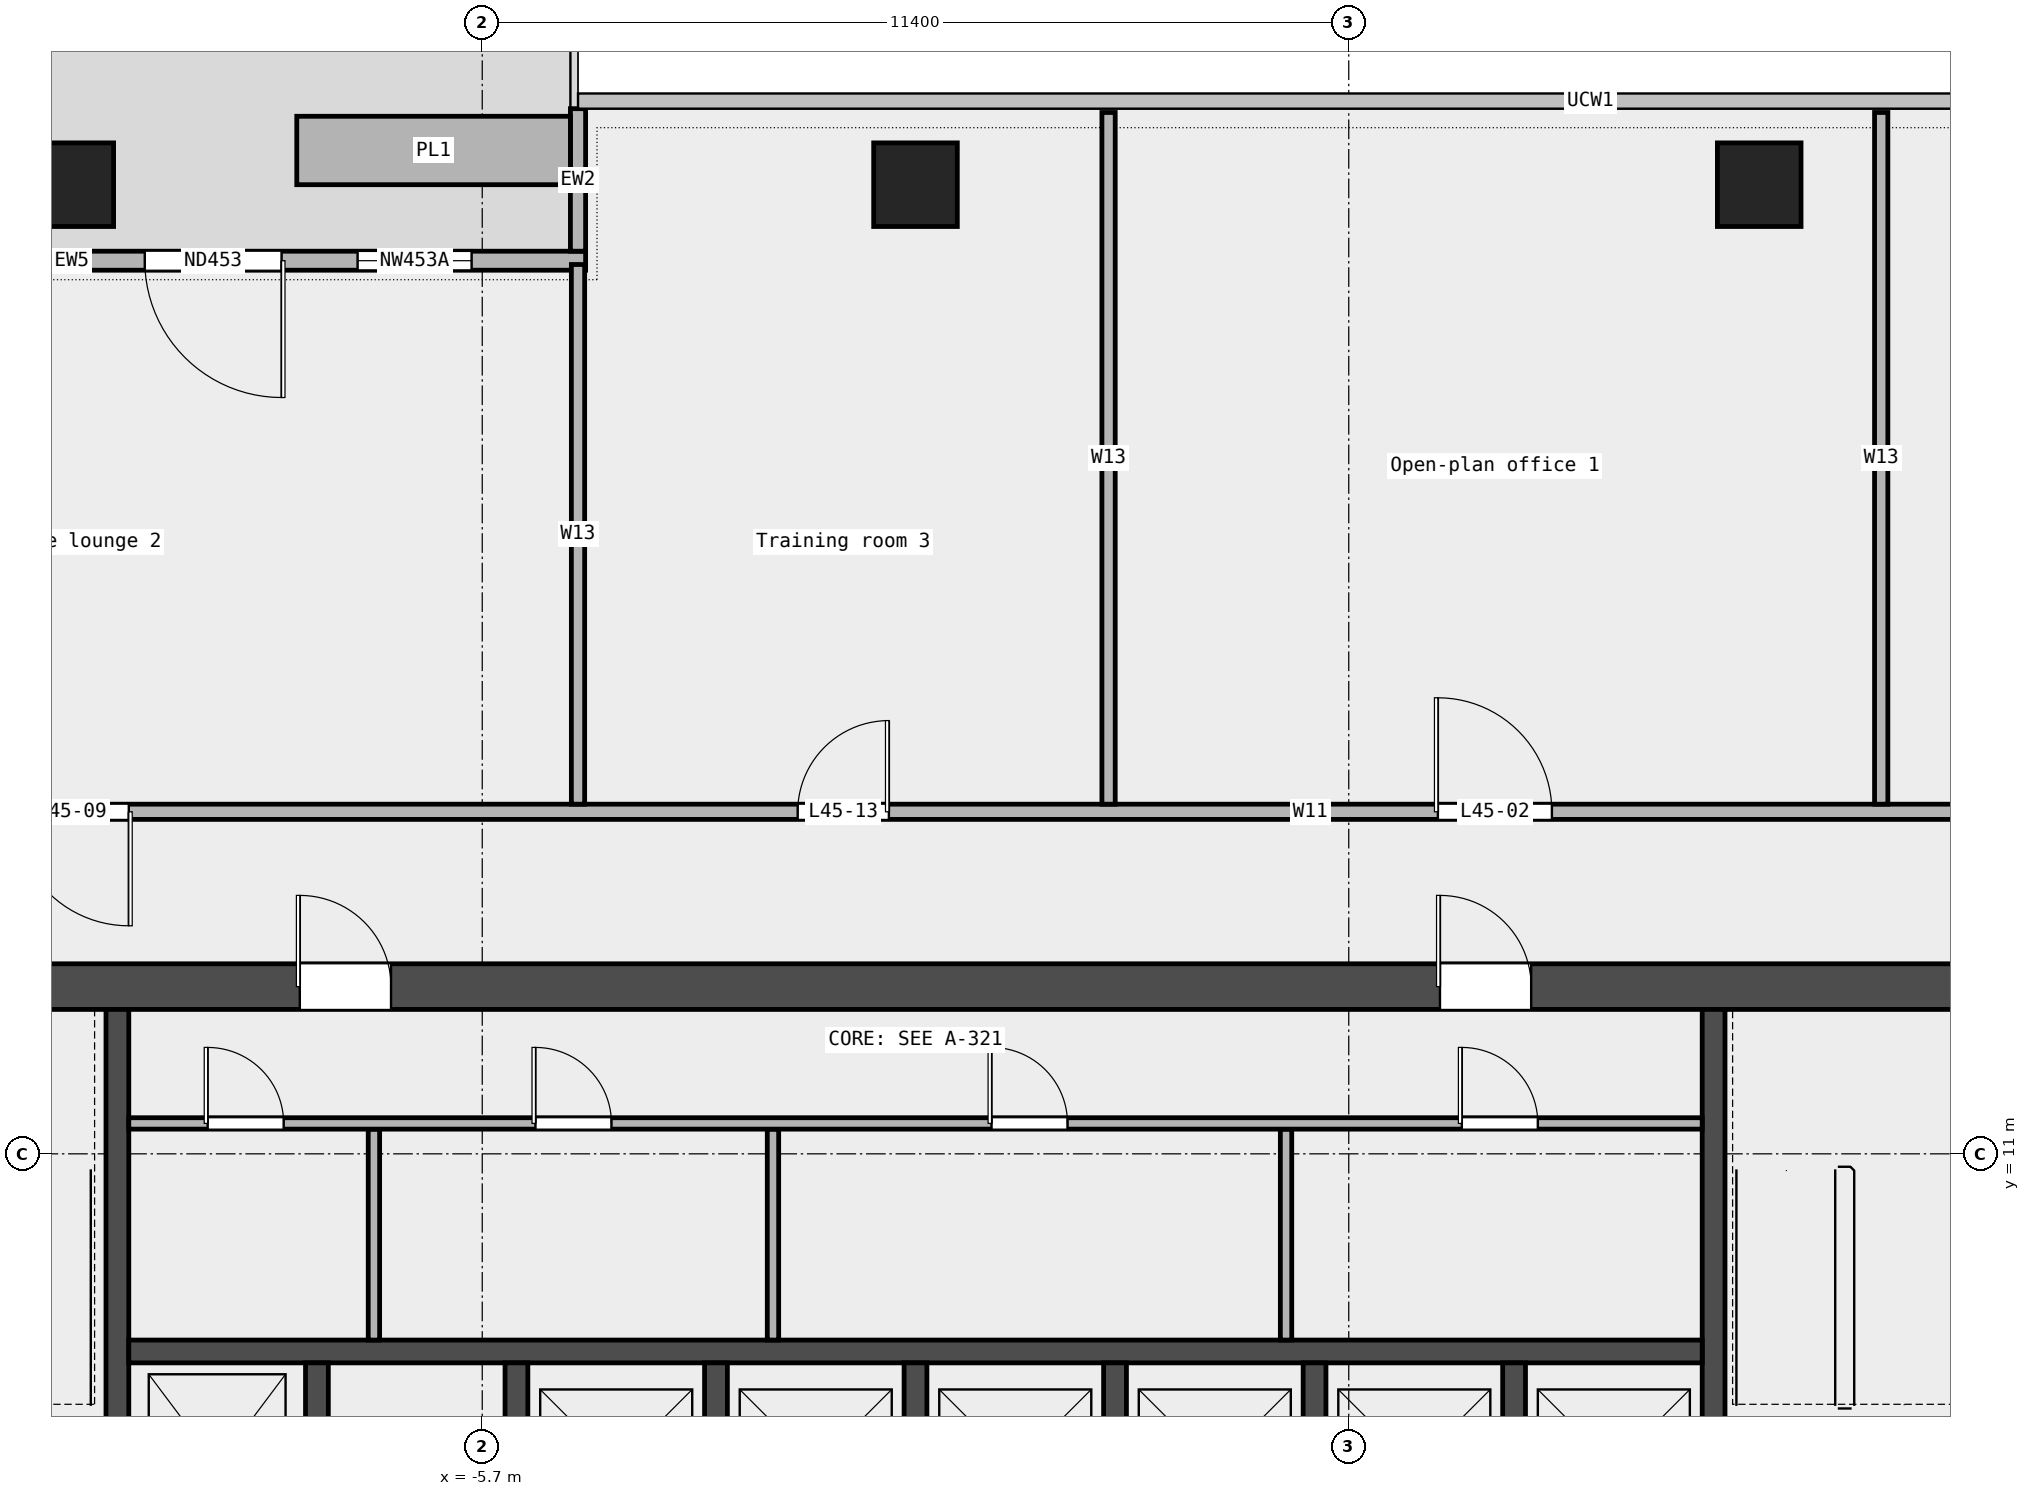
"""IFC4 building model, lengths in metres.
Left out: names, types, materials, properties, quantities, classifications, styles, units other than length and angle.
Written with IfcOpenShell. Run it as: python <this file> out.ifc"""

import sys

from ifc_helpers import new_model, si_unit, direction, frame, frame_2d, origin, origin_2d, place, context, subcontext, project, spatial, rectangle, extrude, element, fill, save


model = new_model("IFC4")
c1 = context("Model", 3, precision=1e-05, world=origin(), true_north=direction((0.0, 1.0)))
c2 = subcontext(c1, "Body", "Model", "MODEL_VIEW")
j1 = project(units=[si_unit("LENGTHUNIT", "METRE"), si_unit("PLANEANGLEUNIT", "RADIAN")], contexts=[c1])
p1 = place(None, origin())
s1 = spatial("IfcSite", under=j1, at=p1, CompositionType="ELEMENT")
p2 = place(p1, origin())
s2 = spatial("IfcBuilding", under=s1, at=p2, CompositionType="ELEMENT")
p3 = place(p2, frame((0.0, 0.0, 215.0)))
s3 = spatial("IfcBuildingStorey", under=s2, at=p3, CompositionType="ELEMENT", Elevation=215.0)
for number, where, z_axis, x_axis in (
    (1, (11.1, 23.75, 0.0), (0.0, 0.0, 1.0), (1.0, 0.0, 0.0)),
    (2, (0.0, 23.75, 0.0), (0.0, 0.0, 1.0), (1.0, 0.0, 0.0)),
    (3, (-11.1, 23.75, 0.0), (0.0, 0.0, 1.0), (1.0, 0.0, 0.0)),
):
    element("IfcColumn", number, at=place(p3, frame(where, z_axis=z_axis, x_axis=x_axis)), inside=s3, PredefinedType="COLUMN", context=c2, shape_type="SweptSolid", body=[
        extrude(rectangle(XDim=1.1, YDim=1.1, at=origin_2d()), origin(), (0.0, 0.0, 1.0), 3.6),
    ])
p4 = place(p3, frame((-4.34, 22.75, 0.0), z_axis=(0.0, 0.0, 1.0), x_axis=(-1.0, 0.0, 0.0)))
e4 = element("IfcWall", 4, at=p4, inside=s3, PredefinedType="STANDARD", context=c2, shape_type="SweptSolid", body=[
    extrude(rectangle(XDim=13.52, YDim=0.25, at=frame_2d((6.76, 0.0))), origin(), (0.0, 0.0, 1.0), 3.6),
])
p5 = place(p4, frame((1.5, 0.0, 0.45)))
e5 = element("IfcOpeningElement", 5, at=p5, cuts=e4, PredefinedType="OPENING", context=c2, shape_type="SweptSolid", body=[
    extrude(rectangle(XDim=1.5, YDim=2.4, at=frame_2d((0.75, 1.2))), frame((0.0, 0.137, 0.0), z_axis=(0.0, -1.0, 0.0), x_axis=(1.0, 0.0, 0.0)), (0.0, 0.0, 1.0), 0.274),
])
p6 = place(p4, frame((4.0, 0.0, 0.0)))
e6 = element("IfcOpeningElement", 6, at=p6, cuts=e4, PredefinedType="OPENING", context=c2, shape_type="SweptSolid", body=[
    extrude(rectangle(XDim=1.8, YDim=2.4, at=frame_2d((0.9, 1.2))), frame((0.0, 0.137, 0.0), z_axis=(0.0, -1.0, 0.0), x_axis=(1.0, 0.0, 0.0)), (0.0, 0.0, 1.0), 0.274),
])
p7 = place(p4, frame((10.5, 0.0, 0.45)))
e7 = element("IfcOpeningElement", 7, at=p7, cuts=e4, PredefinedType="OPENING", context=c2, shape_type="SweptSolid", body=[
    extrude(rectangle(XDim=1.5, YDim=2.4, at=frame_2d((0.75, 1.2))), frame((0.0, 0.137, 0.0), z_axis=(0.0, -1.0, 0.0), x_axis=(1.0, 0.0, 0.0)), (0.0, 0.0, 1.0), 0.274),
])
p8 = place(p3, frame((-4.44, 24.75, 0.0), z_axis=(0.0, 0.0, 1.0), x_axis=(0.0, -1.0, 0.0)))
e8 = element("IfcWall", 8, at=p8, inside=s3, PredefinedType="STANDARD", context=c2, shape_type="SweptSolid", body=[
    extrude(rectangle(XDim=1.875, YDim=0.2, at=frame_2d((0.938, 0.0))), origin(), (0.0, 0.0, 1.0), 3.6),
])
p9 = place(p3, frame((-4.54, 24.2, 0.0), z_axis=(0.0, 0.0, 1.0), x_axis=(-1.0, 0.0, 0.0)))
e9 = element("IfcWall", 9, at=p9, inside=s3, PredefinedType="STANDARD", context=c2, shape_type="SweptSolid", body=[
    extrude(rectangle(XDim=3.6, YDim=0.9, at=frame_2d((1.8, 0.0))), origin(), (0.0, 0.0, 1.0), 0.7),
])
p10 = place(p3, frame((-17.76, 15.5, 0.0), z_axis=(0.0, 0.0, 1.0), x_axis=(1.0, 0.0, 0.0)))
e10 = element("IfcWall", 10, at=p10, inside=s3, PredefinedType="PARTITIONING", context=c2, shape_type="SweptSolid", body=[
    extrude(rectangle(XDim=45.91, YDim=0.2, at=frame_2d((22.955, 0.0))), origin(), (0.0, 0.0, 1.0), 3.6),
])
p11 = place(p10, frame((37.337, 0.0, 0.0)))
e11 = element("IfcOpeningElement", 11, at=p11, cuts=e10, PredefinedType="OPENING", context=c2, shape_type="SweptSolid", body=[
    extrude(rectangle(XDim=1.5, YDim=2.1, at=frame_2d((0.75, 1.05))), frame((0.0, 0.112, 0.0), z_axis=(0.0, -1.0, 0.0), x_axis=(1.0, 0.0, 0.0)), (0.0, 0.0, 1.0), 0.224),
])
p12 = place(p10, frame((24.633, 0.0, 0.0)))
e12 = element("IfcOpeningElement", 12, at=p12, cuts=e10, PredefinedType="OPENING", context=c2, shape_type="SweptSolid", body=[
    extrude(rectangle(XDim=1.5, YDim=2.1, at=frame_2d((0.75, 1.05))), frame((0.0, 0.112, 0.0), z_axis=(0.0, -1.0, 0.0), x_axis=(1.0, 0.0, 0.0)), (0.0, 0.0, 1.0), 0.224),
])
p13 = place(p10, frame((5.91, 0.0, 0.0)))
e13 = element("IfcOpeningElement", 13, at=p13, cuts=e10, PredefinedType="OPENING", context=c2, shape_type="SweptSolid", body=[
    extrude(rectangle(XDim=1.5, YDim=2.1, at=frame_2d((0.75, 1.05))), frame((0.0, 0.112, 0.0), z_axis=(0.0, -1.0, 0.0), x_axis=(1.0, 0.0, 0.0)), (0.0, 0.0, 1.0), 0.224),
])
p14 = place(p10, frame((16.21, 0.0, 0.0)))
e14 = element("IfcOpeningElement", 14, at=p14, cuts=e10, PredefinedType="OPENING", context=c2, shape_type="SweptSolid", body=[
    extrude(rectangle(XDim=1.2, YDim=2.1, at=frame_2d((0.6, 1.05))), frame((0.0, 0.112, 0.0), z_axis=(0.0, -1.0, 0.0), x_axis=(1.0, 0.0, 0.0)), (0.0, 0.0, 1.0), 0.224),
])
p15 = place(p3, frame((-4.44, 15.6, 0.0), z_axis=(0.0, 0.0, 1.0), x_axis=(0.0, 1.0, 0.0)))
e15 = element("IfcWall", 15, at=p15, inside=s3, PredefinedType="PARTITIONING", context=c2, shape_type="SweptSolid", body=[
    extrude(rectangle(XDim=7.1, YDim=0.175, at=frame_2d((3.55, 0.0))), origin(), (0.0, 0.0, 1.0), 3.6),
])
for number, where, z_axis, x_axis in (
    (16, (2.54, 15.6, 0.0), (0.0, 0.0, 1.0), (0.0, 1.0, 0.0)),
    (17, (12.705, 15.6, 0.0), (0.0, 0.0, 1.0), (0.0, 1.0, 0.0)),
):
    element("IfcWall", number, at=place(p3, frame(where, z_axis=z_axis, x_axis=x_axis)), inside=s3, PredefinedType="PARTITIONING", context=c2, shape_type="SweptSolid", body=[
        extrude(rectangle(XDim=9.1, YDim=0.175, at=frame_2d((4.55, 0.0))), origin(), (0.0, 0.0, 1.0), 3.6),
    ])
p16 = place(p3, frame((-14.4, 13.2, 0.0), z_axis=(0.0, 0.0, 1.0), x_axis=(1.0, 0.0, 0.0)))
e18 = element("IfcWall", 18, at=p16, inside=s3, PredefinedType="SHEAR", context=c2, shape_type="SweptSolid", body=[
    extrude(rectangle(XDim=28.8, YDim=0.6, at=frame_2d((14.4, 0.0))), origin(), (0.0, 0.0, 1.0), 3.7),
])
p17 = place(p16, frame((6.3, 0.0, 0.0)))
e19 = element("IfcOpeningElement", 19, at=p17, cuts=e18, PredefinedType="OPENING", context=c2, shape_type="SweptSolid", body=[
    extrude(rectangle(XDim=1.2, YDim=2.1, at=frame_2d((0.6, 1.05))), frame((0.0, 0.312, 0.0), z_axis=(0.0, -1.0, 0.0), x_axis=(1.0, 0.0, 0.0)), (0.0, 0.0, 1.0), 0.624),
])
p18 = place(p16, frame((21.3, 0.0, 0.0)))
e20 = element("IfcOpeningElement", 20, at=p18, cuts=e18, PredefinedType="OPENING", context=c2, shape_type="SweptSolid", body=[
    extrude(rectangle(XDim=1.2, YDim=2.1, at=frame_2d((0.6, 1.05))), frame((0.0, 0.312, 0.0), z_axis=(0.0, -1.0, 0.0), x_axis=(1.0, 0.0, 0.0)), (0.0, 0.0, 1.0), 0.624),
])
for number, where, z_axis, x_axis in (
    (21, (-10.5, 5.25, 0.0), (0.0, 0.0, 1.0), (0.0, 1.0, 0.0)),
    (22, (10.5, 5.25, 0.0), (0.0, 0.0, 1.0), (0.0, 1.0, 0.0)),
):
    element("IfcWall", number, at=place(p3, frame(where, z_axis=z_axis, x_axis=x_axis)), inside=s3, PredefinedType="SHEAR", context=c2, shape_type="SweptSolid", body=[
        extrude(rectangle(XDim=7.65, YDim=0.3, at=frame_2d((3.825, 0.0))), origin(), (0.0, 0.0, 1.0), 3.7),
    ])
p19 = place(p3, frame((-10.35, 8.4, 0.0), z_axis=(0.0, 0.0, 1.0), x_axis=(1.0, 0.0, 0.0)))
e23 = element("IfcWall", 23, at=p19, inside=s3, PredefinedType="SOLIDWALL", context=c2, shape_type="SweptSolid", body=[
    extrude(rectangle(XDim=20.7, YDim=0.3, at=frame_2d((10.35, 0.0))), origin(), (0.0, 0.0, 1.0), 3.7),
])
for number, where, z_axis, x_axis in (
    (24, (-7.875, 5.55, 0.0), (0.0, 0.0, 1.0), (0.0, 1.0, 0.0)),
    (25, (-5.25, 5.55, 0.0), (0.0, 0.0, 1.0), (0.0, 1.0, 0.0)),
    (26, (-2.625, 5.55, 0.0), (0.0, 0.0, 1.0), (0.0, 1.0, 0.0)),
    (27, (0.0, 5.55, 0.0), (0.0, 0.0, 1.0), (0.0, 1.0, 0.0)),
    (28, (2.625, 5.55, 0.0), (0.0, 0.0, 1.0), (0.0, 1.0, 0.0)),
    (29, (5.25, 5.55, 0.0), (0.0, 0.0, 1.0), (0.0, 1.0, 0.0)),
    (30, (7.875, 5.55, 0.0), (0.0, 0.0, 1.0), (0.0, 1.0, 0.0)),
):
    element("IfcWall", number, at=place(p3, frame(where, z_axis=z_axis, x_axis=x_axis)), inside=s3, PredefinedType="SOLIDWALL", context=c2, shape_type="SweptSolid", body=[
        extrude(rectangle(XDim=2.7, YDim=0.3, at=frame_2d((1.35, 0.0))), origin(), (0.0, 0.0, 1.0), 3.7),
    ])
for number, where, z_axis, x_axis in (
    (31, (-7.125, 8.55, 0.0), (0.0, 0.0, 1.0), (0.0, 1.0, 0.0)),
    (32, (-1.875, 8.55, 0.0), (0.0, 0.0, 1.0), (0.0, 1.0, 0.0)),
    (33, (4.875, 8.55, 0.0), (0.0, 0.0, 1.0), (0.0, 1.0, 0.0)),
):
    element("IfcWall", number, at=place(p3, frame(where, z_axis=z_axis, x_axis=x_axis)), inside=s3, PredefinedType="PARTITIONING", context=c2, shape_type="SweptSolid", body=[
        extrude(rectangle(XDim=2.775, YDim=0.15, at=frame_2d((1.387, 0.0))), origin(), (0.0, 0.0, 1.0), 3.7),
    ])
p20 = place(p3, frame((-10.35, 11.4, 0.0), z_axis=(0.0, 0.0, 1.0), x_axis=(1.0, 0.0, 0.0)))
e34 = element("IfcWall", 34, at=p20, inside=s3, PredefinedType="PARTITIONING", context=c2, shape_type="SweptSolid", body=[
    extrude(rectangle(XDim=20.7, YDim=0.15, at=frame_2d((10.35, 0.0))), origin(), (0.0, 0.0, 1.0), 3.7),
])
p21 = place(p20, frame((1.038, 0.0, 0.0)))
e35 = element("IfcOpeningElement", 35, at=p21, cuts=e34, PredefinedType="OPENING", context=c2, shape_type="SweptSolid", body=[
    extrude(rectangle(XDim=1.0, YDim=2.1, at=frame_2d((0.5, 1.05))), frame((0.0, 0.087, 0.0), z_axis=(0.0, -1.0, 0.0), x_axis=(1.0, 0.0, 0.0)), (0.0, 0.0, 1.0), 0.174),
])
p22 = place(p20, frame((5.35, 0.0, 0.0)))
e36 = element("IfcOpeningElement", 36, at=p22, cuts=e34, PredefinedType="OPENING", context=c2, shape_type="SweptSolid", body=[
    extrude(rectangle(XDim=1.0, YDim=2.1, at=frame_2d((0.5, 1.05))), frame((0.0, 0.087, 0.0), z_axis=(0.0, -1.0, 0.0), x_axis=(1.0, 0.0, 0.0)), (0.0, 0.0, 1.0), 0.174),
])
p23 = place(p20, frame((11.35, 0.0, 0.0)))
e37 = element("IfcOpeningElement", 37, at=p23, cuts=e34, PredefinedType="OPENING", context=c2, shape_type="SweptSolid", body=[
    extrude(rectangle(XDim=1.0, YDim=2.1, at=frame_2d((0.5, 1.05))), frame((0.0, 0.087, 0.0), z_axis=(0.0, -1.0, 0.0), x_axis=(1.0, 0.0, 0.0)), (0.0, 0.0, 1.0), 0.174),
])
p24 = place(p20, frame((17.538, 0.0, 0.0)))
e38 = element("IfcOpeningElement", 38, at=p24, cuts=e34, PredefinedType="OPENING", context=c2, shape_type="SweptSolid", body=[
    extrude(rectangle(XDim=1.0, YDim=2.1, at=frame_2d((0.5, 1.05))), frame((0.0, 0.087, 0.0), z_axis=(0.0, -1.0, 0.0), x_axis=(1.0, 0.0, 0.0)), (0.0, 0.0, 1.0), 0.174),
])
p25 = place(p5, origin())
e39 = element("IfcWindow", 39, at=p25, inside=s3, PartitioningType="SINGLE_PANEL", PredefinedType="WINDOW", context=c2, shape_type="SweptSolid", body=[
    extrude(rectangle(XDim=1.5, YDim=2.4, at=frame_2d((0.75, 1.2))), frame((0.0, 0.03, 0.0), z_axis=(0.0, -1.0, 0.0), x_axis=(1.0, 0.0, 0.0)), (0.0, 0.0, 1.0), 0.06),
])
fill(e5, e39)
p26 = place(p6, origin())
e40 = element("IfcDoor", 40, at=p26, inside=s3, OperationType="DOUBLE_DOOR_SINGLE_SWING", PredefinedType="DOOR", context=c2, shape_type="SweptSolid", body=[
    extrude(rectangle(XDim=1.8, YDim=2.4, at=frame_2d((0.9, 1.2))), frame((0.0, 0.025, 0.0), z_axis=(0.0, -1.0, 0.0), x_axis=(1.0, 0.0, 0.0)), (0.0, 0.0, 1.0), 0.05),
])
fill(e6, e40)
p27 = place(p12, origin())
e41 = element("IfcDoor", 41, at=p27, inside=s3, OperationType="DOUBLE_DOOR_SINGLE_SWING", PredefinedType="DOOR", context=c2, shape_type="SweptSolid", body=[
    extrude(rectangle(XDim=1.5, YDim=2.1, at=frame_2d((0.75, 1.05))), frame((0.0, 0.025, 0.0), z_axis=(0.0, -1.0, 0.0), x_axis=(1.0, 0.0, 0.0)), (0.0, 0.0, 1.0), 0.05),
])
fill(e12, e41)
p28 = place(p13, origin())
e42 = element("IfcDoor", 42, at=p28, inside=s3, OperationType="DOUBLE_DOOR_SINGLE_SWING", PredefinedType="DOOR", context=c2, shape_type="SweptSolid", body=[
    extrude(rectangle(XDim=1.5, YDim=2.1, at=frame_2d((0.75, 1.05))), frame((0.0, 0.025, 0.0), z_axis=(0.0, -1.0, 0.0), x_axis=(1.0, 0.0, 0.0)), (0.0, 0.0, 1.0), 0.05),
])
fill(e13, e42)
p29 = place(p14, origin())
e43 = element("IfcDoor", 43, at=p29, inside=s3, OperationType="SINGLE_SWING_RIGHT", PredefinedType="DOOR", context=c2, shape_type="SweptSolid", body=[
    extrude(rectangle(XDim=1.2, YDim=2.1, at=frame_2d((0.6, 1.05))), frame((0.0, 0.025, 0.0), z_axis=(0.0, -1.0, 0.0), x_axis=(1.0, 0.0, 0.0)), (0.0, 0.0, 1.0), 0.05),
])
fill(e14, e43)
p30 = place(p21, origin())
e44 = element("IfcDoor", 44, at=p30, inside=s3, OperationType="SINGLE_SWING_LEFT", PredefinedType="DOOR", context=c2, shape_type="SweptSolid", body=[
    extrude(rectangle(XDim=1.0, YDim=2.1, at=frame_2d((0.5, 1.05))), frame((0.0, 0.025, 0.0), z_axis=(0.0, -1.0, 0.0), x_axis=(1.0, 0.0, 0.0)), (0.0, 0.0, 1.0), 0.05),
])
fill(e35, e44)
p31 = place(p22, origin())
e45 = element("IfcDoor", 45, at=p31, inside=s3, OperationType="SINGLE_SWING_LEFT", PredefinedType="DOOR", context=c2, shape_type="SweptSolid", body=[
    extrude(rectangle(XDim=1.0, YDim=2.1, at=frame_2d((0.5, 1.05))), frame((0.0, 0.025, 0.0), z_axis=(0.0, -1.0, 0.0), x_axis=(1.0, 0.0, 0.0)), (0.0, 0.0, 1.0), 0.05),
])
fill(e36, e45)
p32 = place(p23, origin())
e46 = element("IfcDoor", 46, at=p32, inside=s3, OperationType="SINGLE_SWING_LEFT", PredefinedType="DOOR", context=c2, shape_type="SweptSolid", body=[
    extrude(rectangle(XDim=1.0, YDim=2.1, at=frame_2d((0.5, 1.05))), frame((0.0, 0.025, 0.0), z_axis=(0.0, -1.0, 0.0), x_axis=(1.0, 0.0, 0.0)), (0.0, 0.0, 1.0), 0.05),
])
fill(e37, e46)
p33 = place(p24, origin())
e47 = element("IfcDoor", 47, at=p33, inside=s3, OperationType="SINGLE_SWING_LEFT", PredefinedType="DOOR", context=c2, shape_type="SweptSolid", body=[
    extrude(rectangle(XDim=1.0, YDim=2.1, at=frame_2d((0.5, 1.05))), frame((0.0, 0.025, 0.0), z_axis=(0.0, -1.0, 0.0), x_axis=(1.0, 0.0, 0.0)), (0.0, 0.0, 1.0), 0.05),
])
fill(e38, e47)
p34 = place(p17, origin())
e48 = element("IfcDoor", 48, at=p34, inside=s3, OperationType="SINGLE_SWING_LEFT", PredefinedType="DOOR", context=c2, shape_type="SweptSolid", body=[
    extrude(rectangle(XDim=1.2, YDim=2.1, at=frame_2d((0.6, 1.05))), frame((0.0, 0.025, 0.0), z_axis=(0.0, -1.0, 0.0), x_axis=(1.0, 0.0, 0.0)), (0.0, 0.0, 1.0), 0.05),
])
fill(e19, e48)
p35 = place(p18, origin())
e49 = element("IfcDoor", 49, at=p35, inside=s3, OperationType="SINGLE_SWING_RIGHT", PredefinedType="DOOR", context=c2, shape_type="SweptSolid", body=[
    extrude(rectangle(XDim=1.2, YDim=2.1, at=frame_2d((0.6, 1.05))), frame((0.0, 0.025, 0.0), z_axis=(0.0, -1.0, 0.0), x_axis=(1.0, 0.0, 0.0)), (0.0, 0.0, 1.0), 0.05),
])
fill(e20, e49)
save(model, sys.argv[1])
